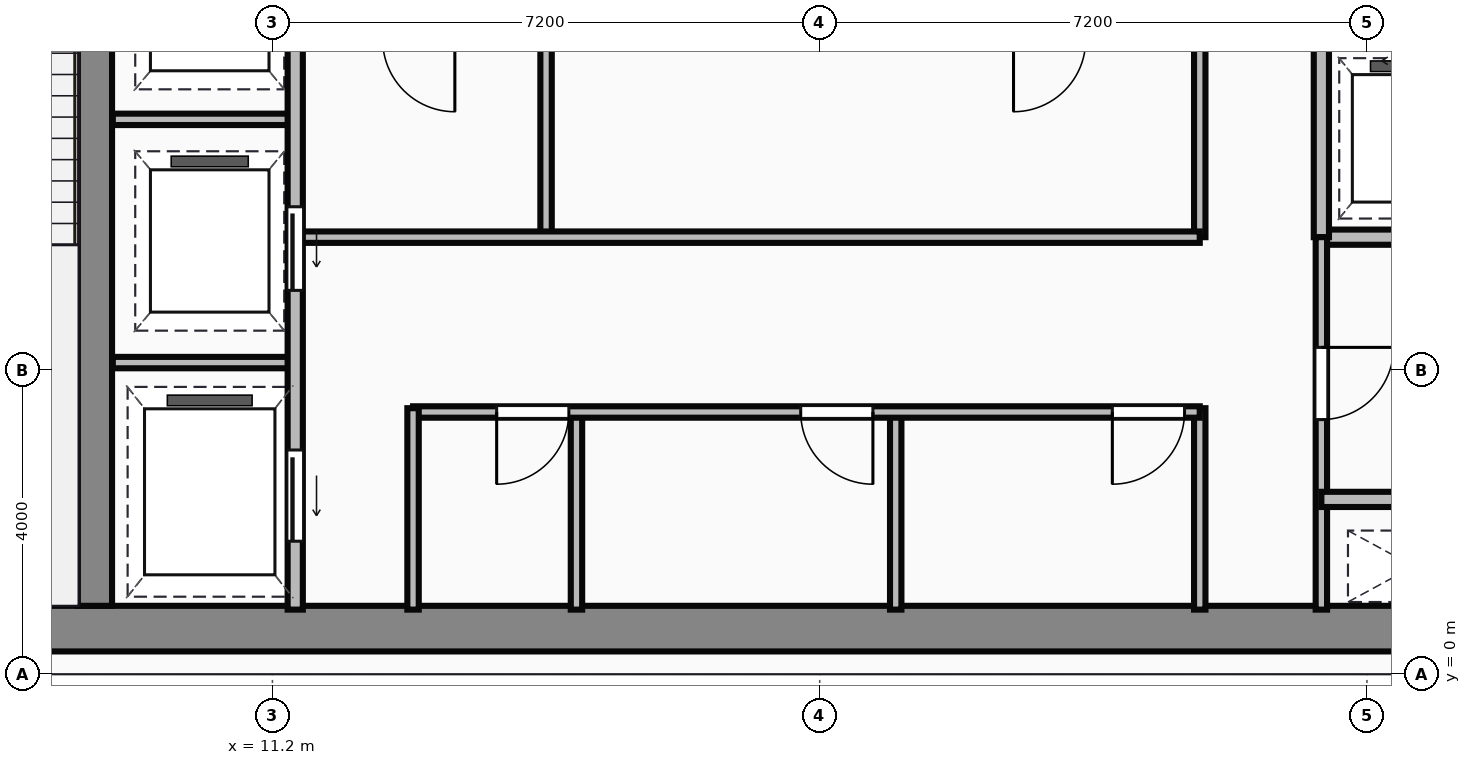
"""IFC4 building model, lengths in metres.
Left out: names, types, materials, properties, quantities, classifications, styles, units other than length and angle.
Written with IfcOpenShell. Run it as: python <this file> out.ifc"""

import sys

from ifc_helpers import new_model, si_unit, direction, frame, frame_2d, origin, place, context, subcontext, project, spatial, rectangle, extrude, source, transform, mapped, element, fill, save


model = new_model("IFC4")
c1 = context("Model", 3, precision=1e-05, world=origin(), true_north=direction((0.0, 1.0)))
c2 = subcontext(c1, "Body", "Model", "MODEL_VIEW")
j1 = project(units=[si_unit("LENGTHUNIT", "METRE"), si_unit("PLANEANGLEUNIT", "RADIAN")], contexts=[c1])
p1 = place(None, origin())
s1 = spatial("IfcSite", under=j1, at=p1, CompositionType="ELEMENT")
p2 = place(p1, origin())
s2 = spatial("IfcBuilding", under=s1, at=p2, CompositionType="ELEMENT")
p3 = place(p2, frame((0.0, 0.0, 255.15)))
s3 = spatial("IfcBuildingStorey", under=s2, at=p3, CompositionType="ELEMENT", Elevation=255.15)
m1 = source(origin(), c2, "Body", "SweptSolid", [
    extrude(rectangle(XDim=29.5, YDim=0.6, at=frame_2d((14.75, 0.0))), origin(), (0.0, 0.0, 1.0), 3.65),
])
p4 = place(p3, frame((4.5, 0.6, 0.0), z_axis=(0.0, 0.0, 1.0), x_axis=(1.0, 0.0, 0.0)))
e1 = element("IfcWall", 1, at=p4, inside=s3, PredefinedType="SHEAR", context=c2, shape_type="MappedRepresentation", body=[
    mapped(m1, transform((0.0, 0.0, 0.0))),
])
m2 = source(origin(), c2, "Body", "SweptSolid", [
    extrude(rectangle(XDim=12.5, YDim=0.45, at=frame_2d((6.25, 0.0))), origin(), (0.0, 0.0, 1.0), 3.65),
])
p5 = place(p3, frame((8.865, 0.9, 0.0), z_axis=(0.0, 0.0, 1.0), x_axis=(0.0, 1.0, 0.0)))
e2 = element("IfcWall", 2, at=p5, inside=s3, PredefinedType="SHEAR", context=c2, shape_type="MappedRepresentation", body=[
    mapped(m2, transform((0.0, 0.0, 0.0))),
])
m3 = source(origin(), c2, "Body", "SweptSolid", [
    extrude(rectangle(XDim=9.6, YDim=0.2, at=frame_2d((4.8, 0.0))), origin(), (0.0, 0.0, 1.0), 3.4),
])
p6 = place(p3, frame((11.5, 0.85, 0.0), z_axis=(0.0, 0.0, 1.0), x_axis=(0.0, 1.0, 0.0)))
e3 = element("IfcWall", 3, at=p6, inside=s3, PredefinedType="PARTITIONING", context=c2, shape_type="MappedRepresentation", body=[
    mapped(m3, transform((0.0, 0.0, 0.0))),
])
p7 = place(p6, frame((4.2, 0.0, 0.0)))
e4 = element("IfcOpeningElement", 4, at=p7, cuts=e3, PredefinedType="OPENING", context=c2, shape_type="SweptSolid", body=[
    extrude(rectangle(XDim=1.1, YDim=2.15, at=frame_2d((0.55, 1.075))), frame((0.0, 0.11, 0.0), z_axis=(0.0, -1.0, 0.0), x_axis=(1.0, 0.0, 0.0)), (0.0, 0.0, 1.0), 0.22),
])
p8 = place(p6, frame((0.9, 0.0, 0.0)))
e5 = element("IfcOpeningElement", 5, at=p8, cuts=e3, PredefinedType="OPENING", context=c2, shape_type="SweptSolid", body=[
    extrude(rectangle(XDim=1.2, YDim=2.15, at=frame_2d((0.6, 1.075))), frame((0.0, 0.11, 0.0), z_axis=(0.0, -1.0, 0.0), x_axis=(1.0, 0.0, 0.0)), (0.0, 0.0, 1.0), 0.22),
])
m4 = source(origin(), c2, "Body", "SweptSolid", [
    extrude(rectangle(XDim=2.4, YDim=0.15, at=frame_2d((1.2, 0.0))), origin(), (0.0, 0.0, 1.0), 3.4),
])
for number, where, z_axis, x_axis in (
    (6, (9.1, 4.1, 0.0), (0.0, 0.0, 1.0), (1.0, 0.0, 0.0)),
    (7, (9.1, 7.3, 0.0), (0.0, 0.0, 1.0), (1.0, 0.0, 0.0)),
):
    element("IfcWall", number, at=place(p3, frame(where, z_axis=z_axis, x_axis=x_axis)), inside=s3, PredefinedType="PARTITIONING", context=c2, shape_type="MappedRepresentation", body=[
        mapped(m4, transform((0.0, 0.0, 0.0))),
    ])
m5 = source(origin(), c2, "Body", "SweptSolid", [
    extrude(rectangle(XDim=2.65, YDim=0.15, at=frame_2d((1.325, 0.0))), origin(), (0.0, 0.0, 1.0), 3.4),
])
p9 = place(p3, frame((13.05, 0.85, 0.0), z_axis=(0.0, 0.0, 1.0), x_axis=(0.0, 1.0, 0.0)))
e8 = element("IfcWall", 8, at=p9, inside=s3, PredefinedType="PARTITIONING", context=c2, shape_type="MappedRepresentation", body=[
    mapped(m5, transform((0.0, 0.0, 0.0))),
])
m6 = source(origin(), c2, "Body", "SweptSolid", [
    extrude(rectangle(XDim=10.35, YDim=0.15, at=frame_2d((5.175, 0.0))), origin(), (0.0, 0.0, 1.0), 3.4),
])
p10 = place(p3, frame((13.05, 3.45, 0.0), z_axis=(0.0, 0.0, 1.0), x_axis=(1.0, 0.0, 0.0)))
e9 = element("IfcWall", 9, at=p10, inside=s3, PredefinedType="PARTITIONING", context=c2, shape_type="MappedRepresentation", body=[
    mapped(m6, transform((0.0, 0.0, 0.0))),
])
p11 = place(p10, frame((1.1, 0.0, 0.0)))
e10 = element("IfcOpeningElement", 10, at=p11, cuts=e9, PredefinedType="OPENING", context=c2, shape_type="SweptSolid", body=[
    extrude(rectangle(XDim=0.95, YDim=2.15, at=frame_2d((0.475, 1.075))), frame((0.0, 0.085, 0.0), z_axis=(0.0, -1.0, 0.0), x_axis=(1.0, 0.0, 0.0)), (0.0, 0.0, 1.0), 0.17),
])
p12 = place(p10, frame((5.1, 0.0, 0.0)))
e11 = element("IfcOpeningElement", 11, at=p12, cuts=e9, PredefinedType="OPENING", context=c2, shape_type="SweptSolid", body=[
    extrude(rectangle(XDim=0.95, YDim=2.15, at=frame_2d((0.475, 1.075))), frame((0.0, 0.085, 0.0), z_axis=(0.0, -1.0, 0.0), x_axis=(1.0, 0.0, 0.0)), (0.0, 0.0, 1.0), 0.17),
])
p13 = place(p10, frame((9.2, 0.0, 0.0)))
e12 = element("IfcOpeningElement", 12, at=p13, cuts=e9, PredefinedType="OPENING", context=c2, shape_type="SweptSolid", body=[
    extrude(rectangle(XDim=0.95, YDim=2.15, at=frame_2d((0.475, 1.075))), frame((0.0, 0.085, 0.0), z_axis=(0.0, -1.0, 0.0), x_axis=(1.0, 0.0, 0.0)), (0.0, 0.0, 1.0), 0.17),
])
p14 = place(p3, frame((23.4, 0.85, 0.0), z_axis=(0.0, 0.0, 1.0), x_axis=(0.0, 1.0, 0.0)))
e13 = element("IfcWall", 13, at=p14, inside=s3, PredefinedType="PARTITIONING", context=c2, shape_type="MappedRepresentation", body=[
    mapped(m5, transform((0.0, 0.0, 0.0))),
])
m7 = source(origin(), c2, "Body", "SweptSolid", [
    extrude(rectangle(XDim=2.6, YDim=0.15, at=frame_2d((1.3, 0.0))), origin(), (0.0, 0.0, 1.0), 3.4),
])
for number, where, z_axis, x_axis in (
    (14, (15.2, 0.85, 0.0), (0.0, 0.0, 1.0), (0.0, 1.0, 0.0)),
    (15, (19.4, 0.85, 0.0), (0.0, 0.0, 1.0), (0.0, 1.0, 0.0)),
):
    element("IfcWall", number, at=place(p3, frame(where, z_axis=z_axis, x_axis=x_axis)), inside=s3, PredefinedType="PARTITIONING", context=c2, shape_type="MappedRepresentation", body=[
        mapped(m7, transform((0.0, 0.0, 0.0))),
    ])
m8 = source(origin(), c2, "Body", "SweptSolid", [
    extrude(rectangle(XDim=11.85, YDim=0.15, at=frame_2d((5.925, 0.0))), origin(), (0.0, 0.0, 1.0), 3.4),
])
p15 = place(p3, frame((11.55, 5.75, 0.0), z_axis=(0.0, 0.0, 1.0), x_axis=(1.0, 0.0, 0.0)))
e16 = element("IfcWall", 16, at=p15, inside=s3, PredefinedType="PARTITIONING", context=c2, shape_type="MappedRepresentation", body=[
    mapped(m8, transform((0.0, 0.0, 0.0))),
])
m9 = source(origin(), c2, "Body", "SweptSolid", [
    extrude(rectangle(XDim=2.6, YDim=0.15, at=frame_2d((1.3, 0.0))), origin(), (0.0, 0.0, 1.0), 3.4),
])
p16 = place(p3, frame((23.4, 5.75, 0.0), z_axis=(0.0, 0.0, 1.0), x_axis=(0.0, 1.0, 0.0)))
e17 = element("IfcWall", 17, at=p16, inside=s3, PredefinedType="PARTITIONING", context=c2, shape_type="MappedRepresentation", body=[
    mapped(m9, transform((0.0, 0.0, 0.0))),
])
m10 = source(origin(), c2, "Body", "SweptSolid", [
    extrude(rectangle(XDim=2.5, YDim=0.15, at=frame_2d((1.25, 0.0))), origin(), (0.0, 0.0, 1.0), 3.4),
])
p17 = place(p3, frame((14.8, 5.8, 0.0), z_axis=(0.0, 0.0, 1.0), x_axis=(0.0, 1.0, 0.0)))
e18 = element("IfcWall", 18, at=p17, inside=s3, PredefinedType="PARTITIONING", context=c2, shape_type="MappedRepresentation", body=[
    mapped(m10, transform((0.0, 0.0, 0.0))),
])
m11 = source(origin(), c2, "Body", "SweptSolid", [
    extrude(rectangle(XDim=4.55, YDim=0.2, at=frame_2d((2.275, 0.0))), origin(), (0.0, 0.0, 1.0), 3.4),
])
p18 = place(p3, frame((25.0, 5.75, 0.0), z_axis=(0.0, 0.0, 1.0), x_axis=(1.0, 0.0, 0.0)))
e19 = element("IfcWall", 19, at=p18, inside=s3, PredefinedType="PARTITIONING", context=c2, shape_type="MappedRepresentation", body=[
    mapped(m11, transform((0.0, 0.0, 0.0))),
])
m12 = source(origin(), c2, "Body", "SweptSolid", [
    extrude(rectangle(XDim=2.6, YDim=0.2, at=frame_2d((1.3, 0.0))), origin(), (0.0, 0.0, 1.0), 3.4),
])
p19 = place(p3, frame((25.0, 5.75, 0.0), z_axis=(0.0, 0.0, 1.0), x_axis=(0.0, 1.0, 0.0)))
e20 = element("IfcWall", 20, at=p19, inside=s3, PredefinedType="PARTITIONING", context=c2, shape_type="MappedRepresentation", body=[
    mapped(m12, transform((0.0, 0.0, 0.0))),
])
m13 = source(origin(), c2, "Body", "SweptSolid", [
    extrude(rectangle(XDim=4.9, YDim=0.15, at=frame_2d((2.45, 0.0))), origin(), (0.0, 0.0, 1.0), 3.4),
])
p20 = place(p3, frame((25.0, 0.85, 0.0), z_axis=(0.0, 0.0, 1.0), x_axis=(0.0, 1.0, 0.0)))
e21 = element("IfcWall", 21, at=p20, inside=s3, PredefinedType="PARTITIONING", context=c2, shape_type="MappedRepresentation", body=[
    mapped(m13, transform((0.0, 0.0, 0.0))),
])
p21 = place(p20, frame((2.5, 0.0, 0.0)))
e22 = element("IfcOpeningElement", 22, at=p21, cuts=e21, PredefinedType="OPENING", context=c2, shape_type="SweptSolid", body=[
    extrude(rectangle(XDim=0.95, YDim=2.15, at=frame_2d((0.475, 1.075))), frame((0.0, 0.085, 0.0), z_axis=(0.0, -1.0, 0.0), x_axis=(1.0, 0.0, 0.0)), (0.0, 0.0, 1.0), 0.17),
])
m14 = source(origin(), c2, "Body", "SweptSolid", [
    extrude(rectangle(XDim=2.4, YDim=0.2, at=frame_2d((1.2, 0.0))), origin(), (0.0, 0.0, 1.0), 3.4),
])
p22 = place(p3, frame((25.0, 2.3, 0.0), z_axis=(0.0, 0.0, 1.0), x_axis=(1.0, 0.0, 0.0)))
e23 = element("IfcWall", 23, at=p22, inside=s3, PredefinedType="PARTITIONING", context=c2, shape_type="MappedRepresentation", body=[
    mapped(m14, transform((0.0, 0.0, 0.0))),
])
m15 = source(origin(), c2, "Body", "SweptSolid", [
    extrude(rectangle(XDim=1.1, YDim=2.15, at=frame_2d((0.55, 1.075))), frame((0.0, 0.025, 0.0), z_axis=(0.0, -1.0, 0.0), x_axis=(1.0, 0.0, 0.0)), (0.0, 0.0, 1.0), 0.05),
])
p23 = place(p7, frame((1.1, 0.0, 0.0), z_axis=(0.0, 0.0, 1.0), x_axis=(-1.0, 0.0, 0.0)))
e24 = element("IfcDoor", 24, at=p23, inside=s3, OperationType="SLIDING_TO_LEFT", PredefinedType="DOOR", context=c2, shape_type="MappedRepresentation", body=[
    mapped(m15, transform((0.0, 0.0, 0.0))),
])
fill(e4, e24)
m16 = source(origin(), c2, "Body", "SweptSolid", [
    extrude(rectangle(XDim=1.2, YDim=2.15, at=frame_2d((0.6, 1.075))), frame((0.0, 0.025, 0.0), z_axis=(0.0, -1.0, 0.0), x_axis=(1.0, 0.0, 0.0)), (0.0, 0.0, 1.0), 0.05),
])
p24 = place(p8, frame((1.2, 0.0, 0.0), z_axis=(0.0, 0.0, 1.0), x_axis=(-1.0, 0.0, 0.0)))
e25 = element("IfcDoor", 25, at=p24, inside=s3, OperationType="SLIDING_TO_LEFT", PredefinedType="DOOR", context=c2, shape_type="MappedRepresentation", body=[
    mapped(m16, transform((0.0, 0.0, 0.0))),
])
fill(e5, e25)
m17 = source(origin(), c2, "Body", "SweptSolid", [
    extrude(rectangle(XDim=0.95, YDim=2.15, at=frame_2d((0.475, 1.075))), frame((0.0, 0.025, 0.0), z_axis=(0.0, -1.0, 0.0), x_axis=(1.0, 0.0, 0.0)), (0.0, 0.0, 1.0), 0.05),
])
p25 = place(p11, origin())
e26 = element("IfcDoor", 26, at=p25, inside=s3, OperationType="SINGLE_SWING_LEFT", PredefinedType="DOOR", context=c2, shape_type="MappedRepresentation", body=[
    mapped(m17, transform((0.0, 0.0, 0.0))),
])
fill(e10, e26)
p26 = place(p12, origin())
e27 = element("IfcDoor", 27, at=p26, inside=s3, OperationType="SINGLE_SWING_RIGHT", PredefinedType="DOOR", context=c2, shape_type="MappedRepresentation", body=[
    mapped(m17, transform((0.0, 0.0, 0.0))),
])
fill(e11, e27)
p27 = place(p13, origin())
e28 = element("IfcDoor", 28, at=p27, inside=s3, OperationType="SINGLE_SWING_LEFT", PredefinedType="DOOR", context=c2, shape_type="MappedRepresentation", body=[
    mapped(m17, transform((0.0, 0.0, 0.0))),
])
fill(e12, e28)
p28 = place(p21, origin())
e29 = element("IfcDoor", 29, at=p28, inside=s3, OperationType="SINGLE_SWING_RIGHT", PredefinedType="DOOR", context=c2, shape_type="MappedRepresentation", body=[
    mapped(m17, transform((0.0, 0.0, 0.0))),
])
fill(e22, e29)
save(model, sys.argv[1])
